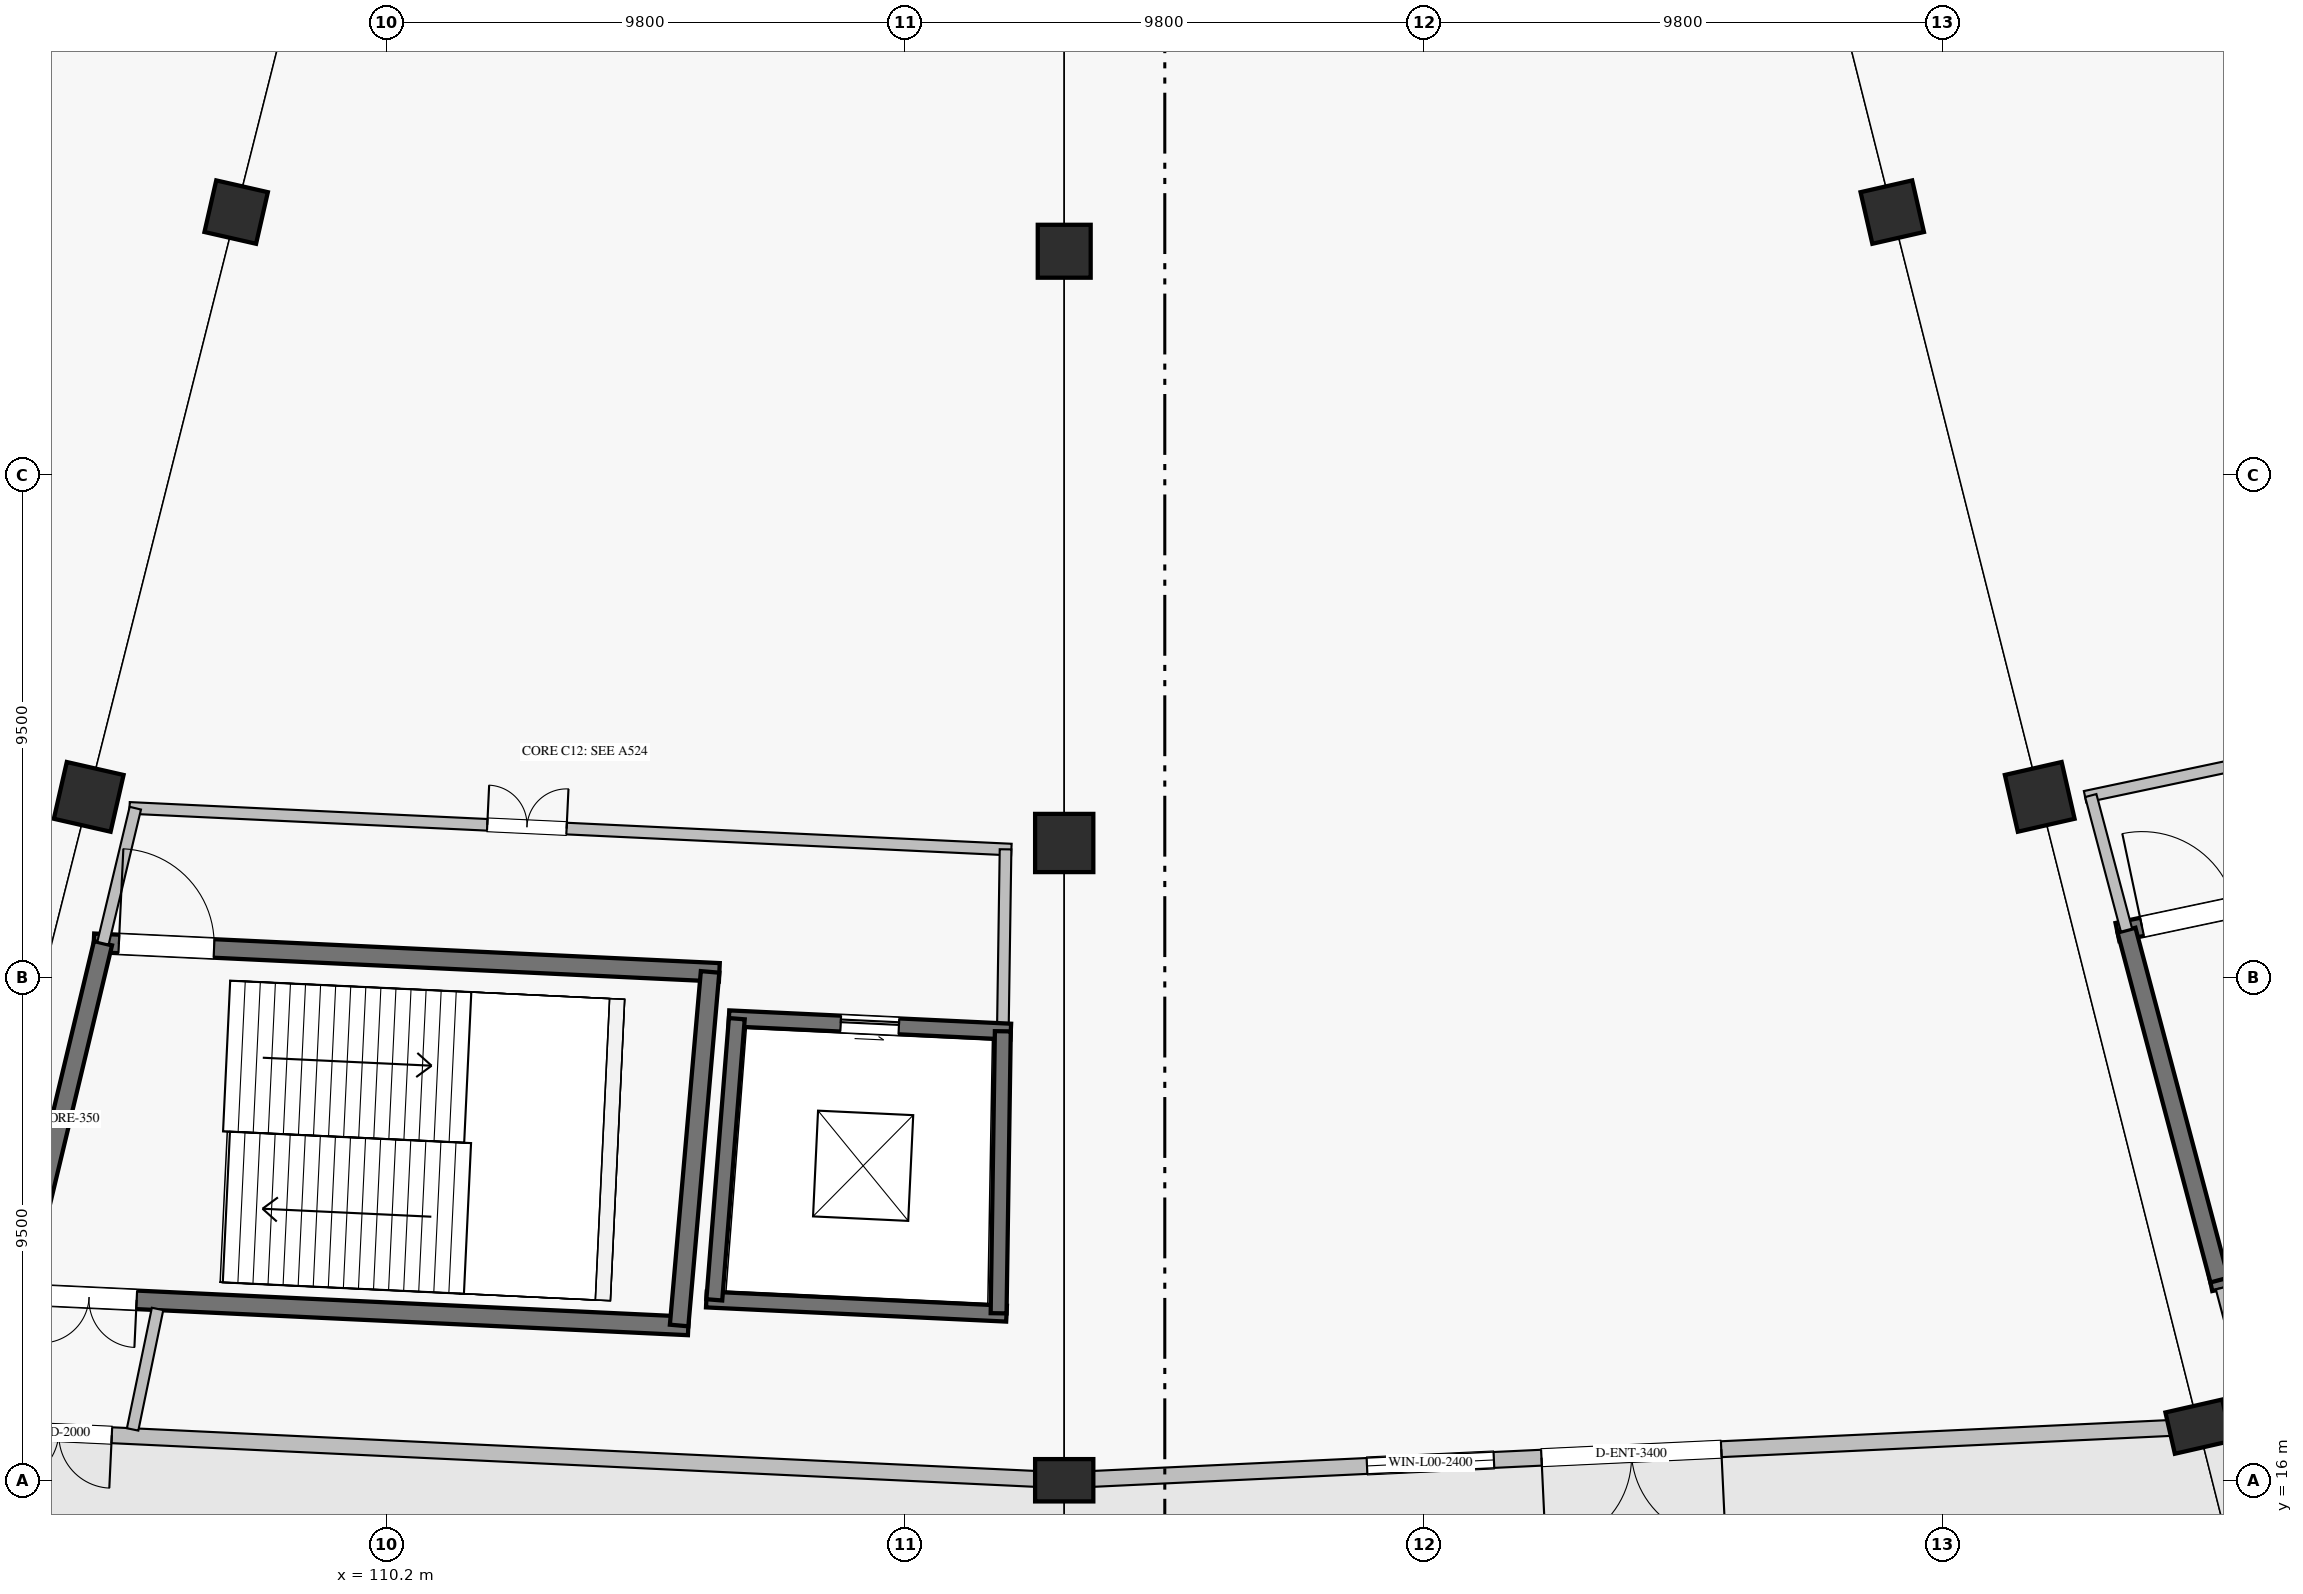
"""IFC4 building model, lengths in metres.
Left out: names, types, materials, properties, quantities, classifications, styles, units other than length and angle.
Written with IfcOpenShell. Run it as: python <this file> out.ifc"""

import sys

from ifc_helpers import new_model, si_unit, direction, frame, frame_2d, origin, origin_2d, place, context, subcontext, project, spatial, rectangle, extrude, element, fill, save


model = new_model("IFC4")
c1 = context("Model", 3, precision=1e-05, world=origin(), true_north=direction((0.0, 1.0)))
c2 = subcontext(c1, "Body", "Model", "MODEL_VIEW")
j1 = project(units=[si_unit("LENGTHUNIT", "METRE"), si_unit("PLANEANGLEUNIT", "RADIAN")], contexts=[c1])
p1 = place(None, origin())
s1 = spatial("IfcSite", under=j1, at=p1, CompositionType="ELEMENT")
p2 = place(p1, origin())
s2 = spatial("IfcBuilding", under=s1, at=p2, CompositionType="ELEMENT")
p3 = place(p2, origin())
s3 = spatial("IfcBuildingStorey", under=s2, at=p3, CompositionType="ELEMENT", Elevation=0.0)
for number, where, z_axis, x_axis in (
    (1, (107.358, 39.96, 0.0), (0.0, 0.0, 1.0), (-0.223, -0.975, 0.0)),
    (2, (123.0, 39.22, 0.0), (0.0, 0.0, 1.0), (0.0, -1.0, 0.0)),
    (3, (138.642, 39.96, 0.0), (0.0, 0.0, 1.0), (0.223, -0.975, 0.0)),
):
    element("IfcColumn", number, at=place(p3, frame(where, z_axis=z_axis, x_axis=x_axis)), inside=s3, PredefinedType="COLUMN", context=c2, shape_type="SweptSolid", body=[
        extrude(rectangle(XDim=1.0, YDim=1.0, at=origin_2d()), origin(), (0.0, 0.0, 1.0), 5.78),
    ])
for number, where, z_axis, x_axis in (
    (4, (104.572, 28.911, 0.0), (0.0, 0.0, 1.0), (-0.223, -0.975, 0.0)),
    (5, (123.0, 28.04, 0.0), (0.0, 0.0, 1.0), (0.0, -1.0, 0.0)),
    (6, (141.428, 28.911, 0.0), (0.0, 0.0, 1.0), (0.223, -0.975, 0.0)),
):
    element("IfcColumn", number, at=place(p3, frame(where, z_axis=z_axis, x_axis=x_axis)), inside=s3, PredefinedType="COLUMN", context=c2, shape_type="SweptSolid", body=[
        extrude(rectangle(XDim=1.1, YDim=1.1, at=origin_2d()), origin(), (0.0, 0.0, 1.0), 5.78),
    ])
for number, where, z_axis, x_axis in (
    (7, (123.0, 16.0, 0.0), (0.0, 0.0, 1.0), (0.0, -1.0, 0.0)),
    (8, (144.428, 17.013, 0.0), (0.0, 0.0, 1.0), (0.223, -0.975, 0.0)),
):
    element("IfcColumn", number, at=place(p3, frame(where, z_axis=z_axis, x_axis=x_axis)), inside=s3, PredefinedType="COLUMN", context=c2, shape_type="SweptSolid", body=[
        extrude(rectangle(XDim=0.8, YDim=1.1, at=origin_2d()), origin(), (0.0, 0.0, 1.0), 5.78),
    ])
p4 = place(p3, frame((101.962, 16.995, 0.0), z_axis=(0.0, 0.0, 1.0), x_axis=(0.998884033728, -0.047230150999, 0.0)))
e9 = element("IfcWall", 9, at=p4, inside=s3, PredefinedType="SOLIDWALL", context=c2, shape_type="SweptSolid", body=[
    extrude(rectangle(XDim=20.671, YDim=0.3, at=frame_2d((10.336, 0.0))), origin(), (0.0, 0.0, 1.0), 4.8),
])
p5 = place(p4, frame((1.05, 0.0, 0.0)))
e10 = element("IfcOpeningElement", 10, at=p5, cuts=e9, PredefinedType="OPENING", context=c2, shape_type="SweptSolid", body=[
    extrude(rectangle(XDim=2.0, YDim=2.3, at=frame_2d((1.0, 1.15))), frame((0.0, 0.16, 0.0), z_axis=(0.0, -1.0, 0.0), x_axis=(1.0, 0.0, 0.0)), (0.0, 0.0, 1.0), 0.32),
])
p6 = place(p3, frame((123.39, 16.018, 0.0), z_axis=(0.0, 0.0, 1.0), x_axis=(0.998884033728, 0.047230150999, 0.0)))
e11 = element("IfcWall", 11, at=p6, inside=s3, PredefinedType="SOLIDWALL", context=c2, shape_type="SweptSolid", body=[
    extrude(rectangle(XDim=20.671, YDim=0.3, at=frame_2d((10.336, 0.0))), origin(), (0.0, 0.0, 1.0), 4.8),
])
p7 = place(p6, frame((8.636, 0.0, 0.0)))
e12 = element("IfcOpeningElement", 12, at=p7, cuts=e11, PredefinedType="OPENING", context=c2, shape_type="SweptSolid", body=[
    extrude(rectangle(XDim=3.4, YDim=2.6, at=frame_2d((1.7, 1.3))), frame((0.0, 0.16, 0.0), z_axis=(0.0, -1.0, 0.0), x_axis=(1.0, 0.0, 0.0)), (0.0, 0.0, 1.0), 0.32),
])
p8 = place(p6, frame((5.336, 0.0, 1.1)))
e13 = element("IfcOpeningElement", 13, at=p8, cuts=e11, PredefinedType="OPENING", context=c2, shape_type="SweptSolid", body=[
    extrude(rectangle(XDim=2.4, YDim=1.8, at=frame_2d((1.2, 0.9))), frame((0.0, 0.16, 0.0), z_axis=(0.0, -1.0, 0.0), x_axis=(1.0, 0.0, 0.0)), (0.0, 0.0, 1.0), 0.32),
])
p9 = place(p3, frame((144.809, 17.094, 0.0), z_axis=(0.0, 0.0, 1.0), x_axis=(0.978345100851, 0.206980346028, 0.0)))
e14 = element("IfcWall", 14, at=p9, inside=s3, PredefinedType="SOLIDWALL", context=c2, shape_type="SweptSolid", body=[
    extrude(rectangle(XDim=21.07, YDim=0.3, at=frame_2d((10.535, 0.0))), origin(), (0.0, 0.0, 1.0), 4.8),
])
p10 = place(p9, frame((1.05, 0.0, 0.0)))
e15 = element("IfcOpeningElement", 15, at=p10, cuts=e14, PredefinedType="OPENING", context=c2, shape_type="SweptSolid", body=[
    extrude(rectangle(XDim=2.0, YDim=2.3, at=frame_2d((1.0, 1.15))), frame((0.0, 0.16, 0.0), z_axis=(0.0, -1.0, 0.0), x_axis=(1.0, 0.0, 0.0)), (0.0, 0.0, 1.0), 0.32),
])
p11 = place(p3, frame((104.667, 26.155, 0.0), z_axis=(0.0, 0.0, 1.0), x_axis=(0.998883770468, -0.04723571843, 0.0)))
e16 = element("IfcWall", 16, at=p11, inside=s3, PredefinedType="SHEAR", context=c2, shape_type="SweptSolid", body=[
    extrude(rectangle(XDim=11.831, YDim=0.35, at=frame_2d((5.916, 0.0))), origin(), (0.0, 0.0, 1.0), 5.5),
])
p12 = place(p11, frame((0.475, 0.0, 0.0)))
e17 = element("IfcOpeningElement", 17, at=p12, cuts=e16, PredefinedType="OPENING", context=c2, shape_type="SweptSolid", body=[
    extrude(rectangle(XDim=1.8, YDim=2.2, at=frame_2d((0.9, 1.1))), frame((0.0, 0.185, 0.0), z_axis=(0.0, -1.0, 0.0), x_axis=(1.0, 0.0, 0.0)), (0.0, 0.0, 1.0), 0.37),
])
p13 = place(p3, frame((103.08, 19.522, 0.0), z_axis=(0.0, 0.0, 1.0), x_axis=(0.998884004857, -0.047230761603, 0.0)))
e18 = element("IfcWall", 18, at=p13, inside=s3, PredefinedType="SHEAR", context=c2, shape_type="SweptSolid", body=[
    extrude(rectangle(XDim=12.835, YDim=0.35, at=frame_2d((6.417, 0.0))), origin(), (0.0, 0.0, 1.0), 5.5),
])
p14 = place(p13, frame((0.601, 0.0, 0.0)))
e19 = element("IfcOpeningElement", 19, at=p14, cuts=e18, PredefinedType="OPENING", context=c2, shape_type="SweptSolid", body=[
    extrude(rectangle(XDim=1.8, YDim=2.2, at=frame_2d((0.9, 1.1))), frame((0.0, 0.185, 0.0), z_axis=(0.0, -1.0, 0.0), x_axis=(1.0, 0.0, 0.0)), (0.0, 0.0, 1.0), 0.37),
])
p15 = place(p3, frame((105.873, 19.237, 0.0), z_axis=(0.0, 0.0, 1.0), x_axis=(-0.202636866681, -0.979253950853, 0.0)))
e20 = element("IfcWall", 20, at=p15, inside=s3, PredefinedType="SOLIDWALL", context=c2, shape_type="SweptSolid", body=[
    extrude(rectangle(XDim=2.324, YDim=0.22, at=frame_2d((1.162, 0.0))), origin(), (0.0, 0.0, 1.0), 5.5),
])
p16 = place(p3, frame((104.842, 26.146, 0.0), z_axis=(0.0, 0.0, 1.0), x_axis=(-0.232820532896, -0.972519716747, 0.0)))
e21 = element("IfcWall", 21, at=p16, inside=s3, PredefinedType="SHEAR", context=c2, shape_type="SweptSolid", body=[
    extrude(rectangle(XDim=6.82, YDim=0.35, at=frame_2d((3.41, 0.0))), origin(), (0.0, 0.0, 1.0), 5.5),
])
p17 = place(p3, frame((116.31, 25.604, 0.0), z_axis=(0.0, 0.0, 1.0), x_axis=(-0.087232889326, -0.996187945631, 0.0)))
e22 = element("IfcWall", 22, at=p17, inside=s3, PredefinedType="SHEAR", context=c2, shape_type="SweptSolid", body=[
    extrude(rectangle(XDim=6.706, YDim=0.35, at=frame_2d((3.353, 0.0))), origin(), (0.0, 0.0, 1.0), 5.5),
])
p18 = place(p3, frame((116.665, 24.728, 0.0), z_axis=(0.0, 0.0, 1.0), x_axis=(0.998882494219, -0.047262699282, 0.0)))
e23 = element("IfcWall", 23, at=p18, inside=s3, PredefinedType="SHEAR", context=c2, shape_type="SweptSolid", body=[
    extrude(rectangle(XDim=5.331, YDim=0.3, at=frame_2d((2.666, 0.0))), origin(), (0.0, 0.0, 1.0), 5.5),
])
p19 = place(p18, frame((2.115, 0.0, 0.0)))
e24 = element("IfcOpeningElement", 24, at=p19, cuts=e23, PredefinedType="OPENING", context=c2, shape_type="SweptSolid", body=[
    extrude(rectangle(XDim=1.1, YDim=2.2, at=frame_2d((0.55, 1.1))), frame((0.0, 0.16, 0.0), z_axis=(0.0, -1.0, 0.0), x_axis=(1.0, 0.0, 0.0)), (0.0, 0.0, 1.0), 0.32),
])
p20 = place(p3, frame((116.24, 19.416, 0.0), z_axis=(0.0, 0.0, 1.0), x_axis=(0.998884329444, -0.047223896393, 0.0)))
e25 = element("IfcWall", 25, at=p20, inside=s3, PredefinedType="SHEAR", context=c2, shape_type="SweptSolid", body=[
    extrude(rectangle(XDim=5.677, YDim=0.3, at=frame_2d((2.838, 0.0))), origin(), (0.0, 0.0, 1.0), 5.5),
])
p21 = place(p3, frame((116.815, 24.72, 0.0), z_axis=(0.0, 0.0, 1.0), x_axis=(-0.079807132276, -0.996810323802, 0.0)))
e26 = element("IfcWall", 26, at=p21, inside=s3, PredefinedType="SHEAR", context=c2, shape_type="SweptSolid", body=[
    extrude(rectangle(XDim=5.329, YDim=0.3, at=frame_2d((2.665, 0.0))), origin(), (0.0, 0.0, 1.0), 5.5),
])
p22 = place(p3, frame((121.84, 24.483, 0.0), z_axis=(0.0, 0.0, 1.0), x_axis=(-0.014935332807, -0.999888461697, 0.0)))
e27 = element("IfcWall", 27, at=p22, inside=s3, PredefinedType="SHEAR", context=c2, shape_type="SweptSolid", body=[
    extrude(rectangle(XDim=5.329, YDim=0.3, at=frame_2d((2.665, 0.0))), origin(), (0.0, 0.0, 1.0), 5.5),
])
p23 = place(p3, frame((105.343, 28.703, 0.0), z_axis=(0.0, 0.0, 1.0), x_axis=(0.998884242682, -0.047225731555, 0.0)))
e28 = element("IfcWall", 28, at=p23, inside=s3, PredefinedType="SOLIDWALL", context=c2, shape_type="SweptSolid", body=[
    extrude(rectangle(XDim=16.677, YDim=0.22, at=frame_2d((8.339, 0.0))), origin(), (0.0, 0.0, 1.0), 4.448),
])
p24 = place(p23, frame((6.766, 0.0, 0.0)))
e29 = element("IfcOpeningElement", 29, at=p24, cuts=e28, PredefinedType="OPENING", context=c2, shape_type="SweptSolid", body=[
    extrude(rectangle(XDim=1.5, YDim=2.2, at=frame_2d((0.75, 1.1))), frame((0.0, 0.12, 0.0), z_axis=(0.0, -1.0, 0.0), x_axis=(1.0, 0.0, 0.0)), (0.0, 0.0, 1.0), 0.24),
])
p25 = place(p3, frame((105.453, 28.698, 0.0), z_axis=(0.0, 0.0, 1.0), x_axis=(-0.232756927197, -0.972534941707, 0.0)))
e30 = element("IfcWall", 30, at=p25, inside=s3, PredefinedType="SOLIDWALL", context=c2, shape_type="SweptSolid", body=[
    extrude(rectangle(XDim=2.623, YDim=0.22, at=frame_2d((1.312, 0.0))), origin(), (0.0, 0.0, 1.0), 5.5),
])
p26 = place(p3, frame((121.892, 27.92, 0.0), z_axis=(0.0, 0.0, 1.0), x_axis=(-0.014984113027, -0.999887731876, 0.0)))
e31 = element("IfcWall", 31, at=p26, inside=s3, PredefinedType="SOLIDWALL", context=c2, shape_type="SweptSolid", body=[
    extrude(rectangle(XDim=3.438, YDim=0.22, at=frame_2d((1.719, 0.0))), origin(), (0.0, 0.0, 1.0), 5.5),
])
p27 = place(p3, frame((142.896, 26.357, 0.0), z_axis=(0.0, 0.0, 1.0), x_axis=(0.978345203961, 0.206979858648, 0.0)))
e32 = element("IfcWall", 32, at=p27, inside=s3, PredefinedType="SHEAR", context=c2, shape_type="SweptSolid", body=[
    extrude(rectangle(XDim=12.044, YDim=0.35, at=frame_2d((6.022, 0.0))), origin(), (0.0, 0.0, 1.0), 5.5),
])
p28 = place(p27, frame((0.475, 0.0, 0.0)))
e33 = element("IfcOpeningElement", 33, at=p28, cuts=e32, PredefinedType="OPENING", context=c2, shape_type="SweptSolid", body=[
    extrude(rectangle(XDim=1.8, YDim=2.2, at=frame_2d((0.9, 1.1))), frame((0.0, 0.185, 0.0), z_axis=(0.0, -1.0, 0.0), x_axis=(1.0, 0.0, 0.0)), (0.0, 0.0, 1.0), 0.37),
])
p29 = place(p3, frame((144.65, 19.746, 0.0), z_axis=(0.0, 0.0, 1.0), x_axis=(0.978345119536, 0.206980257705, 0.0)))
e34 = element("IfcWall", 34, at=p29, inside=s3, PredefinedType="SHEAR", context=c2, shape_type="SweptSolid", body=[
    extrude(rectangle(XDim=13.067, YDim=0.35, at=frame_2d((6.533, 0.0))), origin(), (0.0, 0.0, 1.0), 5.5),
])
p30 = place(p29, frame((0.582, 0.0, 0.0)))
e35 = element("IfcOpeningElement", 35, at=p30, cuts=e34, PredefinedType="OPENING", context=c2, shape_type="SweptSolid", body=[
    extrude(rectangle(XDim=1.8, YDim=2.2, at=frame_2d((0.9, 1.1))), frame((0.0, 0.185, 0.0), z_axis=(0.0, -1.0, 0.0), x_axis=(1.0, 0.0, 0.0)), (0.0, 0.0, 1.0), 0.37),
])
p31 = place(p3, frame((144.861, 19.632, 0.0), z_axis=(0.0, 0.0, 1.0), x_axis=(0.256541848889, -0.966533123989, 0.0)))
e36 = element("IfcWall", 36, at=p31, inside=s3, PredefinedType="SOLIDWALL", context=c2, shape_type="SweptSolid", body=[
    extrude(rectangle(XDim=2.346, YDim=0.22, at=frame_2d((1.173, 0.0))), origin(), (0.0, 0.0, 1.0), 5.5),
])
p32 = place(p3, frame((143.067, 26.394, 0.0), z_axis=(0.0, 0.0, 1.0), x_axis=(0.256518400663, -0.966539347425, 0.0)))
e37 = element("IfcWall", 37, at=p32, inside=s3, PredefinedType="SHEAR", context=c2, shape_type="SweptSolid", body=[
    extrude(rectangle(XDim=6.84, YDim=0.35, at=frame_2d((3.42, 0.0))), origin(), (0.0, 0.0, 1.0), 5.5),
])
p33 = place(p3, frame((142.284, 28.914, 0.0), z_axis=(0.0, 0.0, 1.0), x_axis=(0.97834522483, 0.206979760008, 0.0)))
e38 = element("IfcWall", 38, at=p33, inside=s3, PredefinedType="SOLIDWALL", context=c2, shape_type="SweptSolid", body=[
    extrude(rectangle(XDim=16.983, YDim=0.22, at=frame_2d((8.491, 0.0))), origin(), (0.0, 0.0, 1.0), 4.448),
])
p34 = place(p33, frame((6.903, 0.0, 0.0)))
e39 = element("IfcOpeningElement", 39, at=p34, cuts=e38, PredefinedType="OPENING", context=c2, shape_type="SweptSolid", body=[
    extrude(rectangle(XDim=1.5, YDim=2.2, at=frame_2d((0.75, 1.1))), frame((0.0, 0.12, 0.0), z_axis=(0.0, -1.0, 0.0), x_axis=(1.0, 0.0, 0.0)), (0.0, 0.0, 1.0), 0.24),
])
p35 = place(p3, frame((142.392, 28.936, 0.0), z_axis=(0.0, 0.0, 1.0), x_axis=(0.256507243456, -0.966542308466, 0.0)))
e40 = element("IfcWall", 40, at=p35, inside=s3, PredefinedType="SOLIDWALL", context=c2, shape_type="SweptSolid", body=[
    extrude(rectangle(XDim=2.631, YDim=0.22, at=frame_2d((1.315, 0.0))), origin(), (0.0, 0.0, 1.0), 5.5),
])
p36 = place(p5, frame((2.0, 0.0, 0.0), z_axis=(0.0, 0.0, 1.0), x_axis=(-1.0, 0.0, 0.0)))
e41 = element("IfcDoor", 41, at=p36, inside=s3, OperationType="DOUBLE_DOOR_SINGLE_SWING", PredefinedType="DOOR", context=c2, shape_type="SweptSolid", body=[
    extrude(rectangle(XDim=2.0, YDim=2.3, at=frame_2d((1.0, 1.15))), frame((0.0, 0.025, 0.0), z_axis=(0.0, -1.0, 0.0), x_axis=(1.0, 0.0, 0.0)), (0.0, 0.0, 1.0), 0.05),
])
fill(e10, e41)
p37 = place(p7, frame((3.4, 0.0, 0.0), z_axis=(0.0, 0.0, 1.0), x_axis=(-1.0, 0.0, 0.0)))
e42 = element("IfcDoor", 42, at=p37, inside=s3, OperationType="DOUBLE_DOOR_SINGLE_SWING", PredefinedType="DOOR", context=c2, shape_type="SweptSolid", body=[
    extrude(rectangle(XDim=3.4, YDim=2.6, at=frame_2d((1.7, 1.3))), frame((0.0, 0.025, 0.0), z_axis=(0.0, -1.0, 0.0), x_axis=(1.0, 0.0, 0.0)), (0.0, 0.0, 1.0), 0.05),
])
fill(e12, e42)
p38 = place(p8, origin())
e43 = element("IfcWindow", 43, at=p38, inside=s3, PartitioningType="SINGLE_PANEL", PredefinedType="WINDOW", context=c2, shape_type="SweptSolid", body=[
    extrude(rectangle(XDim=2.4, YDim=1.8, at=frame_2d((1.2, 0.9))), frame((0.0, 0.03, 0.0), z_axis=(0.0, -1.0, 0.0), x_axis=(1.0, 0.0, 0.0)), (0.0, 0.0, 1.0), 0.06),
])
fill(e13, e43)
p39 = place(p14, frame((1.8, 0.0, 0.0), z_axis=(0.0, 0.0, 1.0), x_axis=(-1.0, 0.0, 0.0)))
e44 = element("IfcDoor", 44, at=p39, inside=s3, OperationType="DOUBLE_DOOR_SINGLE_SWING", PredefinedType="DOOR", context=c2, shape_type="SweptSolid", body=[
    extrude(rectangle(XDim=1.8, YDim=2.2, at=frame_2d((0.9, 1.1))), frame((0.0, 0.025, 0.0), z_axis=(0.0, -1.0, 0.0), x_axis=(1.0, 0.0, 0.0)), (0.0, 0.0, 1.0), 0.05),
])
fill(e19, e44)
p40 = place(p12, origin())
e45 = element("IfcDoor", 45, at=p40, inside=s3, OperationType="SINGLE_SWING_LEFT", PredefinedType="DOOR", context=c2, shape_type="SweptSolid", body=[
    extrude(rectangle(XDim=1.8, YDim=2.2, at=frame_2d((0.9, 1.1))), frame((0.0, 0.025, 0.0), z_axis=(0.0, -1.0, 0.0), x_axis=(1.0, 0.0, 0.0)), (0.0, 0.0, 1.0), 0.05),
])
fill(e17, e45)
p41 = place(p19, origin())
e46 = element("IfcDoor", 46, at=p41, inside=s3, OperationType="SLIDING_TO_RIGHT", PredefinedType="DOOR", context=c2, shape_type="SweptSolid", body=[
    extrude(rectangle(XDim=1.1, YDim=2.2, at=frame_2d((0.55, 1.1))), frame((0.0, 0.025, 0.0), z_axis=(0.0, -1.0, 0.0), x_axis=(1.0, 0.0, 0.0)), (0.0, 0.0, 1.0), 0.05),
])
fill(e24, e46)
p42 = place(p24, origin())
e47 = element("IfcDoor", 47, at=p42, inside=s3, OperationType="DOUBLE_DOOR_SINGLE_SWING", PredefinedType="DOOR", context=c2, shape_type="SweptSolid", body=[
    extrude(rectangle(XDim=1.5, YDim=2.2, at=frame_2d((0.75, 1.1))), frame((0.0, 0.025, 0.0), z_axis=(0.0, -1.0, 0.0), x_axis=(1.0, 0.0, 0.0)), (0.0, 0.0, 1.0), 0.05),
])
fill(e29, e47)
p43 = place(p28, origin())
e48 = element("IfcDoor", 48, at=p43, inside=s3, OperationType="SINGLE_SWING_LEFT", PredefinedType="DOOR", context=c2, shape_type="SweptSolid", body=[
    extrude(rectangle(XDim=1.8, YDim=2.2, at=frame_2d((0.9, 1.1))), frame((0.0, 0.025, 0.0), z_axis=(0.0, -1.0, 0.0), x_axis=(1.0, 0.0, 0.0)), (0.0, 0.0, 1.0), 0.05),
])
fill(e33, e48)
save(model, sys.argv[1])
